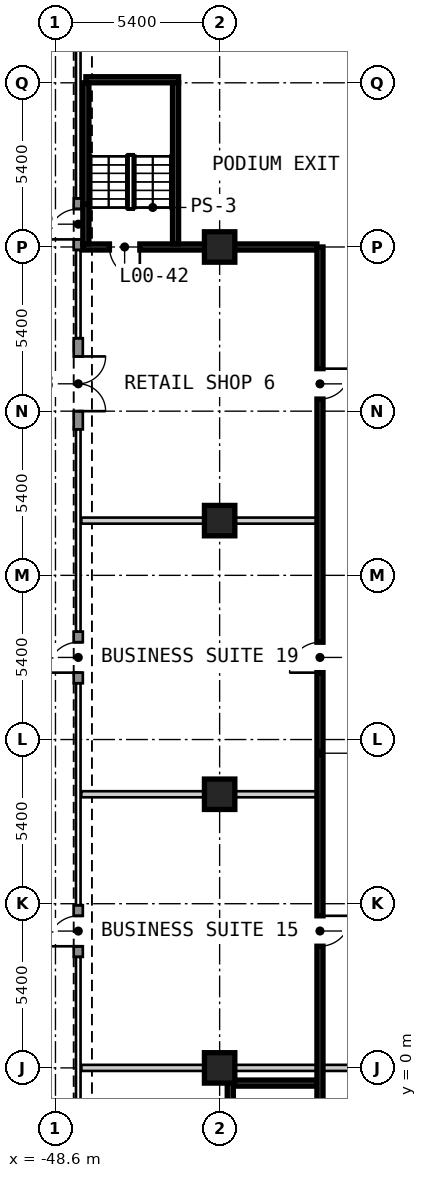
"""IFC4 building model, lengths in metres.
Left out: names, types, materials, properties, quantities, classifications, styles, units other than length and angle.
Written with IfcOpenShell. Run it as: python <this file> out.ifc"""

import sys

from ifc_helpers import new_model, si_unit, direction, frame, frame_2d, origin, origin_2d, place, context, subcontext, project, spatial, rectangle, extrude, element, fill, save


model = new_model("IFC4")
c1 = context("Model", 3, precision=1e-05, world=origin(), true_north=direction((0.0, 1.0)))
c2 = subcontext(c1, "Body", "Model", "MODEL_VIEW")
j1 = project(units=[si_unit("LENGTHUNIT", "METRE"), si_unit("PLANEANGLEUNIT", "RADIAN")], contexts=[c1])
p1 = place(None, origin())
s1 = spatial("IfcSite", under=j1, at=p1, CompositionType="ELEMENT")
p2 = place(p1, origin())
s2 = spatial("IfcBuilding", under=s1, at=p2, CompositionType="ELEMENT")
p3 = place(p2, origin())
s3 = spatial("IfcBuildingStorey", under=s2, at=p3, CompositionType="ELEMENT", Elevation=0.0)
for number, where, z_axis, x_axis in (
    (1, (-43.2, 0.0, 0.0), (0.0, 0.0, 1.0), (1.0, 0.0, 0.0)),
    (2, (-43.2, 9.0, 0.0), (0.0, 0.0, 1.0), (1.0, 0.0, 0.0)),
    (3, (-43.2, 18.0, 0.0), (0.0, 0.0, 1.0), (1.0, 0.0, 0.0)),
    (4, (-43.2, 27.0, 0.0), (0.0, 0.0, 1.0), (1.0, 0.0, 0.0)),
):
    element("IfcColumn", number, at=place(p3, frame(where, z_axis=z_axis, x_axis=x_axis)), inside=s3, PredefinedType="COLUMN", context=c2, shape_type="SweptSolid", body=[
        extrude(rectangle(XDim=1.0, YDim=1.0, at=origin_2d()), origin(), (0.0, 0.0, 1.0), 5.0),
    ])
p4 = place(p3, frame((-47.85, 28.6, 0.0), z_axis=(0.0, 0.0, 1.0), x_axis=(0.0, -1.0, 0.0)))
e5 = element("IfcWall", 5, at=p4, inside=s3, PredefinedType="SOLIDWALL", context=c2, shape_type="SweptSolid", body=[
    extrude(rectangle(XDim=1.7, YDim=0.3, at=frame_2d((0.85, 0.0))), origin(), (0.0, 0.0, 1.0), 4.55),
])
p5 = place(p4, frame((1.35, 0.0, 0.0), z_axis=(0.0, 0.0, 1.0), x_axis=(-1.0, 0.0, 0.0)))
e6 = element("IfcOpeningElement", 6, at=p5, cuts=e5, PredefinedType="OPENING", context=c2, shape_type="SweptSolid", body=[
    extrude(rectangle(XDim=1.0, YDim=2.4, at=frame_2d((0.5, 1.2))), frame((0.0, 0.16, 0.0), z_axis=(0.0, -1.0, 0.0), x_axis=(1.0, 0.0, 0.0)), (0.0, 0.0, 1.0), 0.32),
])
p6 = place(p3, frame((-47.85, 24.0, 0.0), z_axis=(0.0, 0.0, 1.0), x_axis=(0.0, -1.0, 0.0)))
e7 = element("IfcWall", 7, at=p6, inside=s3, PredefinedType="SOLIDWALL", context=c2, shape_type="SweptSolid", body=[
    extrude(rectangle(XDim=3.0, YDim=0.3, at=frame_2d((1.5, 0.0))), origin(), (0.0, 0.0, 1.0), 4.55),
])
p7 = place(p6, frame((2.4, 0.0, 0.0), z_axis=(0.0, 0.0, 1.0), x_axis=(-1.0, 0.0, 0.0)))
e8 = element("IfcOpeningElement", 8, at=p7, cuts=e7, PredefinedType="OPENING", context=c2, shape_type="SweptSolid", body=[
    extrude(rectangle(XDim=1.8, YDim=2.4, at=frame_2d((0.9, 1.2))), frame((0.0, 0.16, 0.0), z_axis=(0.0, -1.0, 0.0), x_axis=(1.0, 0.0, 0.0)), (0.0, 0.0, 1.0), 0.32),
])
p8 = place(p3, frame((-47.85, 14.35, 0.0), z_axis=(0.0, 0.0, 1.0), x_axis=(0.0, -1.0, 0.0)))
e9 = element("IfcWall", 9, at=p8, inside=s3, PredefinedType="SOLIDWALL", context=c2, shape_type="SweptSolid", body=[
    extrude(rectangle(XDim=1.7, YDim=0.3, at=frame_2d((0.85, 0.0))), origin(), (0.0, 0.0, 1.0), 4.55),
])
p9 = place(p8, frame((1.35, 0.0, 0.0), z_axis=(0.0, 0.0, 1.0), x_axis=(-1.0, 0.0, 0.0)))
e10 = element("IfcOpeningElement", 10, at=p9, cuts=e9, PredefinedType="OPENING", context=c2, shape_type="SweptSolid", body=[
    extrude(rectangle(XDim=1.0, YDim=2.4, at=frame_2d((0.5, 1.2))), frame((0.0, 0.16, 0.0), z_axis=(0.0, -1.0, 0.0), x_axis=(1.0, 0.0, 0.0)), (0.0, 0.0, 1.0), 0.32),
])
p10 = place(p3, frame((-47.85, 5.35, 0.0), z_axis=(0.0, 0.0, 1.0), x_axis=(0.0, -1.0, 0.0)))
e11 = element("IfcWall", 11, at=p10, inside=s3, PredefinedType="SOLIDWALL", context=c2, shape_type="SweptSolid", body=[
    extrude(rectangle(XDim=1.7, YDim=0.3, at=frame_2d((0.85, 0.0))), origin(), (0.0, 0.0, 1.0), 4.55),
])
p11 = place(p10, frame((1.35, 0.0, 0.0), z_axis=(0.0, 0.0, 1.0), x_axis=(-1.0, 0.0, 0.0)))
e12 = element("IfcOpeningElement", 12, at=p11, cuts=e11, PredefinedType="OPENING", context=c2, shape_type="SweptSolid", body=[
    extrude(rectangle(XDim=1.0, YDim=2.4, at=frame_2d((0.5, 1.2))), frame((0.0, 0.16, 0.0), z_axis=(0.0, -1.0, 0.0), x_axis=(1.0, 0.0, 0.0)), (0.0, 0.0, 1.0), 0.32),
])
p12 = place(p3, frame((-42.85, -0.5, 0.0), z_axis=(0.0, 0.0, 1.0), x_axis=(1.0, 0.0, 0.0)))
e13 = element("IfcWall", 13, at=p12, inside=s3, PredefinedType="SOLIDWALL", context=c2, shape_type="SweptSolid", body=[
    extrude(rectangle(XDim=2.85, YDim=0.2, at=frame_2d((1.425, 0.0))), origin(), (0.0, 0.0, 1.0), 4.55),
])
p13 = place(p3, frame((-47.75, 0.0, 0.0), z_axis=(0.0, 0.0, 1.0), x_axis=(1.0, 0.0, 0.0)))
e14 = element("IfcWall", 14, at=p13, inside=s3, PredefinedType="PARTITIONING", context=c2, shape_type="SweptSolid", body=[
    extrude(rectangle(XDim=7.75, YDim=0.2, at=frame_2d((3.875, 0.0))), origin(), (0.0, 0.0, 1.0), 4.55),
])
p14 = place(p3, frame((-39.8, 0.0, 0.0), z_axis=(0.0, 0.0, 1.0), x_axis=(1.0, 0.0, 0.0)))
e15 = element("IfcWall", 15, at=p14, inside=s3, PredefinedType="PARTITIONING", context=c2, shape_type="SweptSolid", body=[
    extrude(rectangle(XDim=9.651, YDim=0.2, at=frame_2d((4.826, 0.0))), origin(), (0.0, 0.0, 1.0), 4.55),
])
p15 = place(p14, frame((2.702, 0.0, 0.0)))
e16 = element("IfcOpeningElement", 16, at=p15, cuts=e15, PredefinedType="OPENING", context=c2, shape_type="SweptSolid", body=[
    extrude(rectangle(XDim=1.8, YDim=2.1, at=frame_2d((0.9, 1.05))), frame((0.0, 0.11, 0.0), z_axis=(0.0, -1.0, 0.0), x_axis=(1.0, 0.0, 0.0)), (0.0, 0.0, 1.0), 0.22),
])
for number, where, z_axis, x_axis in (
    (17, (-47.75, 9.0, 0.0), (0.0, 0.0, 1.0), (1.0, 0.0, 0.0)),
    (18, (-47.75, 18.0, 0.0), (0.0, 0.0, 1.0), (1.0, 0.0, 0.0)),
):
    element("IfcWall", number, at=place(p3, frame(where, z_axis=z_axis, x_axis=x_axis)), inside=s3, PredefinedType="PARTITIONING", context=c2, shape_type="SweptSolid", body=[
        extrude(rectangle(XDim=7.75, YDim=0.2, at=frame_2d((3.875, 0.0))), origin(), (0.0, 0.0, 1.0), 4.55),
    ])
p16 = place(p3, frame((-47.7, 27.0, 0.0), z_axis=(0.0, 0.0, 1.0), x_axis=(1.0, 0.0, 0.0)))
e19 = element("IfcWall", 19, at=p16, inside=s3, PredefinedType="SOLIDWALL", context=c2, shape_type="SweptSolid", body=[
    extrude(rectangle(XDim=7.7, YDim=0.2, at=frame_2d((3.85, 0.0))), origin(), (0.0, 0.0, 1.0), 4.55),
])
p17 = place(p16, frame((0.875, 0.0, 0.0)))
e20 = element("IfcOpeningElement", 20, at=p17, cuts=e19, PredefinedType="OPENING", context=c2, shape_type="SweptSolid", body=[
    extrude(rectangle(XDim=1.0, YDim=2.1, at=frame_2d((0.5, 1.05))), frame((0.0, 0.11, 0.0), z_axis=(0.0, -1.0, 0.0), x_axis=(1.0, 0.0, 0.0)), (0.0, 0.0, 1.0), 0.22),
])
p18 = place(p3, frame((-47.6, 32.5, 0.0), z_axis=(0.0, 0.0, 1.0), x_axis=(1.0, 0.0, 0.0)))
e21 = element("IfcWall", 21, at=p18, inside=s3, PredefinedType="SOLIDWALL", context=c2, shape_type="SweptSolid", body=[
    extrude(rectangle(XDim=3.05, YDim=0.2, at=frame_2d((1.525, 0.0))), origin(), (0.0, 0.0, 1.0), 4.55),
])
p19 = place(p3, frame((-44.65, 27.1, 0.0), z_axis=(0.0, 0.0, 1.0), x_axis=(0.0, 1.0, 0.0)))
e22 = element("IfcWall", 22, at=p19, inside=s3, PredefinedType="SOLIDWALL", context=c2, shape_type="SweptSolid", body=[
    extrude(rectangle(XDim=5.3, YDim=0.2, at=frame_2d((2.65, 0.0))), origin(), (0.0, 0.0, 1.0), 4.55),
])
p20 = place(p3, frame((-42.85, -6.0, 0.0), z_axis=(0.0, 0.0, 1.0), x_axis=(0.0, 1.0, 0.0)))
e23 = element("IfcWall", 23, at=p20, inside=s3, PredefinedType="SOLIDWALL", context=c2, shape_type="SweptSolid", body=[
    extrude(rectangle(XDim=5.9, YDim=0.2, at=frame_2d((2.95, 0.0))), origin(), (0.0, 0.0, 1.0), 4.55),
])
p21 = place(p3, frame((-39.9, -6.3, 0.0), z_axis=(0.0, 0.0, 1.0), x_axis=(0.0, 1.0, 0.0)))
e24 = element("IfcWall", 24, at=p21, inside=s3, PredefinedType="SOLIDWALL", context=c2, shape_type="SweptSolid", body=[
    extrude(rectangle(XDim=33.3, YDim=0.2, at=frame_2d((16.65, 0.0))), origin(), (0.0, 0.0, 1.0), 4.55),
])
p22 = place(p21, frame((10.302, 0.0, 0.0)))
e25 = element("IfcOpeningElement", 25, at=p22, cuts=e24, PredefinedType="OPENING", context=c2, shape_type="SweptSolid", body=[
    extrude(rectangle(XDim=1.0, YDim=2.1, at=frame_2d((0.5, 1.05))), frame((0.0, 0.11, 0.0), z_axis=(0.0, -1.0, 0.0), x_axis=(1.0, 0.0, 0.0)), (0.0, 0.0, 1.0), 0.22),
])
p23 = place(p21, frame((19.3, 0.0, 0.0)))
e26 = element("IfcOpeningElement", 26, at=p23, cuts=e24, PredefinedType="OPENING", context=c2, shape_type="SweptSolid", body=[
    extrude(rectangle(XDim=1.0, YDim=2.1, at=frame_2d((0.5, 1.05))), frame((0.0, 0.11, 0.0), z_axis=(0.0, -1.0, 0.0), x_axis=(1.0, 0.0, 0.0)), (0.0, 0.0, 1.0), 0.22),
])
p24 = place(p21, frame((28.298, 0.0, 0.0)))
e27 = element("IfcOpeningElement", 27, at=p24, cuts=e24, PredefinedType="OPENING", context=c2, shape_type="SweptSolid", body=[
    extrude(rectangle(XDim=1.0, YDim=2.1, at=frame_2d((0.5, 1.05))), frame((0.0, 0.11, 0.0), z_axis=(0.0, -1.0, 0.0), x_axis=(1.0, 0.0, 0.0)), (0.0, 0.0, 1.0), 0.22),
])
p25 = place(p21, frame((1.45, 0.0, 0.0), z_axis=(0.0, 0.0, 1.0), x_axis=(-1.0, 0.0, 0.0)))
e28 = element("IfcOpeningElement", 28, at=p25, cuts=e24, PredefinedType="OPENING", context=c2, shape_type="SweptSolid", body=[
    extrude(rectangle(XDim=1.0, YDim=2.1, at=frame_2d((0.5, 1.05))), frame((0.0, 0.11, 0.0), z_axis=(0.0, -1.0, 0.0), x_axis=(1.0, 0.0, 0.0)), (0.0, 0.0, 1.0), 0.22),
])
p26 = place(p3, frame((-47.6, 28.4, 0.0), z_axis=(0.0, 0.0, 1.0), x_axis=(0.0, 1.0, 0.0)))
e29 = element("IfcWall", 29, at=p26, inside=s3, PredefinedType="SOLIDWALL", context=c2, shape_type="SweptSolid", body=[
    extrude(rectangle(XDim=4.0, YDim=0.2, at=frame_2d((2.0, 0.0))), origin(), (0.0, 0.0, 1.0), 4.55),
])
p27 = place(p3, frame((-47.6, 27.1, 2.3), z_axis=(0.0, 0.0, 1.0), x_axis=(0.0, 1.0, 0.0)))
e30 = element("IfcWall", 30, at=p27, inside=s3, PredefinedType="SOLIDWALL", context=c2, shape_type="SweptSolid", body=[
    extrude(rectangle(XDim=1.3, YDim=0.2, at=frame_2d((0.65, 0.0))), origin(), (0.0, 0.0, 1.0), 2.25),
])
p28 = place(p5, origin())
e31 = element("IfcDoor", 31, at=p28, inside=s3, OperationType="SINGLE_SWING_RIGHT", PredefinedType="DOOR", context=c2, shape_type="SweptSolid", body=[
    extrude(rectangle(XDim=1.0, YDim=2.4, at=frame_2d((0.5, 1.2))), frame((0.0, 0.025, 0.0), z_axis=(0.0, -1.0, 0.0), x_axis=(1.0, 0.0, 0.0)), (0.0, 0.0, 1.0), 0.05),
])
fill(e6, e31)
p29 = place(p7, origin())
e32 = element("IfcDoor", 32, at=p29, inside=s3, OperationType="DOUBLE_DOOR_DOUBLE_SWING", PredefinedType="DOOR", context=c2, shape_type="SweptSolid", body=[
    extrude(rectangle(XDim=1.8, YDim=2.4, at=frame_2d((0.9, 1.2))), frame((0.0, 0.025, 0.0), z_axis=(0.0, -1.0, 0.0), x_axis=(1.0, 0.0, 0.0)), (0.0, 0.0, 1.0), 0.05),
])
fill(e8, e32)
p30 = place(p9, origin())
e33 = element("IfcDoor", 33, at=p30, inside=s3, OperationType="SINGLE_SWING_RIGHT", PredefinedType="DOOR", context=c2, shape_type="SweptSolid", body=[
    extrude(rectangle(XDim=1.0, YDim=2.4, at=frame_2d((0.5, 1.2))), frame((0.0, 0.025, 0.0), z_axis=(0.0, -1.0, 0.0), x_axis=(1.0, 0.0, 0.0)), (0.0, 0.0, 1.0), 0.05),
])
fill(e10, e33)
p31 = place(p11, origin())
e34 = element("IfcDoor", 34, at=p31, inside=s3, OperationType="SINGLE_SWING_RIGHT", PredefinedType="DOOR", context=c2, shape_type="SweptSolid", body=[
    extrude(rectangle(XDim=1.0, YDim=2.4, at=frame_2d((0.5, 1.2))), frame((0.0, 0.025, 0.0), z_axis=(0.0, -1.0, 0.0), x_axis=(1.0, 0.0, 0.0)), (0.0, 0.0, 1.0), 0.05),
])
fill(e12, e34)
p32 = place(p22, origin())
e35 = element("IfcDoor", 35, at=p32, inside=s3, OperationType="SINGLE_SWING_RIGHT", PredefinedType="DOOR", context=c2, shape_type="SweptSolid", body=[
    extrude(rectangle(XDim=1.0, YDim=2.1, at=frame_2d((0.5, 1.05))), frame((0.0, 0.025, 0.0), z_axis=(0.0, -1.0, 0.0), x_axis=(1.0, 0.0, 0.0)), (0.0, 0.0, 1.0), 0.05),
])
fill(e25, e35)
p33 = place(p23, origin())
e36 = element("IfcDoor", 36, at=p33, inside=s3, OperationType="SINGLE_SWING_LEFT", PredefinedType="DOOR", context=c2, shape_type="SweptSolid", body=[
    extrude(rectangle(XDim=1.0, YDim=2.1, at=frame_2d((0.5, 1.05))), frame((0.0, 0.025, 0.0), z_axis=(0.0, -1.0, 0.0), x_axis=(1.0, 0.0, 0.0)), (0.0, 0.0, 1.0), 0.05),
])
fill(e26, e36)
p34 = place(p24, origin())
e37 = element("IfcDoor", 37, at=p34, inside=s3, OperationType="SINGLE_SWING_RIGHT", PredefinedType="DOOR", context=c2, shape_type="SweptSolid", body=[
    extrude(rectangle(XDim=1.0, YDim=2.1, at=frame_2d((0.5, 1.05))), frame((0.0, 0.025, 0.0), z_axis=(0.0, -1.0, 0.0), x_axis=(1.0, 0.0, 0.0)), (0.0, 0.0, 1.0), 0.05),
])
fill(e27, e37)
p35 = place(p17, origin())
e38 = element("IfcDoor", 38, at=p35, inside=s3, OperationType="SINGLE_SWING_RIGHT", PredefinedType="DOOR", context=c2, shape_type="SweptSolid", body=[
    extrude(rectangle(XDim=1.0, YDim=2.1, at=frame_2d((0.5, 1.05))), frame((0.0, 0.025, 0.0), z_axis=(0.0, -1.0, 0.0), x_axis=(1.0, 0.0, 0.0)), (0.0, 0.0, 1.0), 0.05),
])
fill(e20, e38)
save(model, sys.argv[1])
